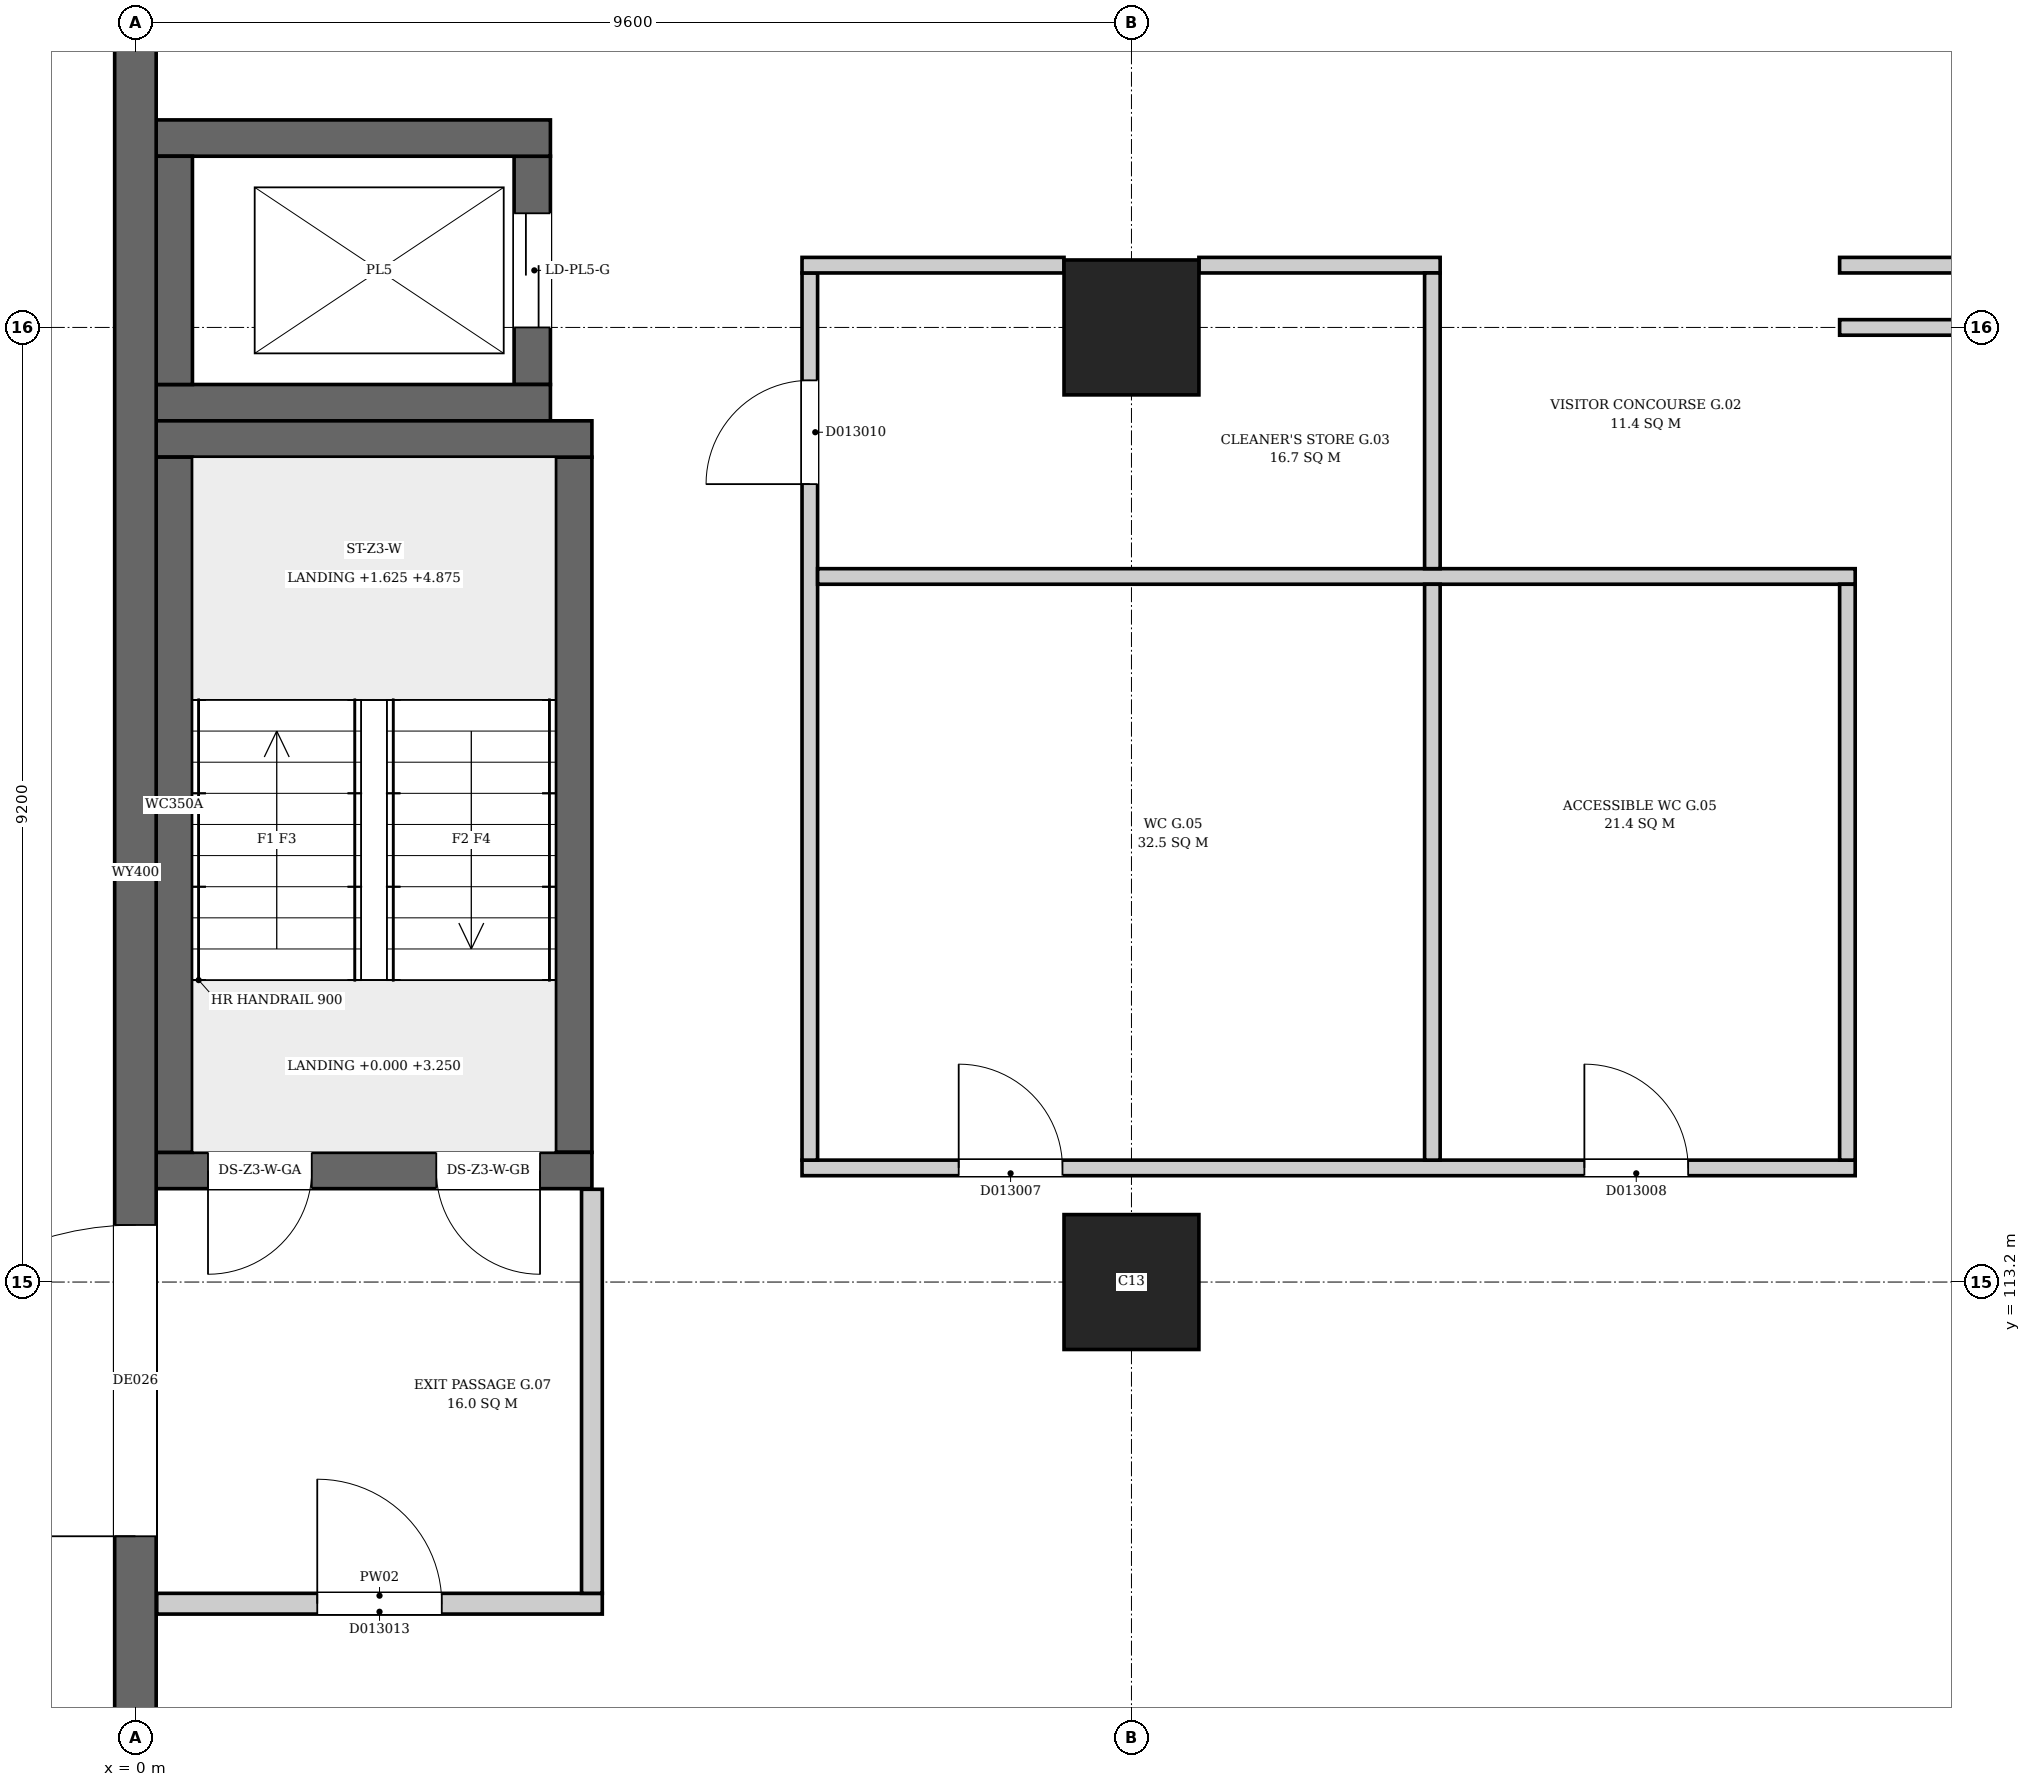
"""IFC4 building model, lengths in metres.
Left out: names, types, materials, properties, quantities, classifications, styles, units other than length and angle.
Written with IfcOpenShell. Run it as: python <this file> out.ifc"""

import sys

from ifc_helpers import new_model, si_unit, direction, frame, frame_2d, origin, origin_2d, place, context, subcontext, project, spatial, rectangle, extrude, element, fill, save


model = new_model("IFC4")
c1 = context("Model", 3, precision=1e-05, world=origin(), true_north=direction((0.0, 1.0)))
c2 = subcontext(c1, "Body", "Model", "MODEL_VIEW")
j1 = project(units=[si_unit("LENGTHUNIT", "METRE"), si_unit("PLANEANGLEUNIT", "RADIAN")], contexts=[c1])
p1 = place(None, origin())
s1 = spatial("IfcSite", under=j1, at=p1, CompositionType="ELEMENT")
p2 = place(p1, origin())
s2 = spatial("IfcBuilding", under=s1, at=p2, CompositionType="ELEMENT")
p3 = place(p2, origin())
s3 = spatial("IfcBuildingStorey", under=s2, at=p3, CompositionType="ELEMENT", Elevation=0.0)
p4 = place(p3, frame((0.0, 94.12, 0.0), z_axis=(0.0, 0.0, 1.0), x_axis=(0.0, 1.0, 0.0)))
e1 = element("IfcWall", 1, at=p4, inside=s3, PredefinedType="SHEAR", context=c2, shape_type="SweptSolid", body=[
    extrude(rectangle(XDim=46.88, YDim=0.4, at=frame_2d((23.44, 0.0))), origin(), (0.0, 0.0, 1.0), 6.5),
])
p5 = place(p4, frame((16.63, 0.0, 0.0)))
e2 = element("IfcOpeningElement", 2, at=p5, cuts=e1, PredefinedType="OPENING", context=c2, shape_type="SweptSolid", body=[
    extrude(rectangle(XDim=3.0, YDim=2.4, at=frame_2d((1.5, 1.2))), frame((0.0, 0.21, 0.0), z_axis=(0.0, -1.0, 0.0), x_axis=(1.0, 0.0, 0.0)), (0.0, 0.0, 1.0), 0.42),
])
p6 = place(p3, frame((0.2, 114.275, 0.0), z_axis=(0.0, 0.0, 1.0), x_axis=(1.0, 0.0, 0.0)))
e3 = element("IfcWall", 3, at=p6, inside=s3, PredefinedType="SHEAR", context=c2, shape_type="SweptSolid", body=[
    extrude(rectangle(XDim=4.2, YDim=0.35, at=frame_2d((2.1, 0.0))), origin(), (0.0, 0.0, 1.0), 6.5),
])
p7 = place(p6, frame((0.5, 0.0, 0.0)))
e4 = element("IfcOpeningElement", 4, at=p7, cuts=e3, PredefinedType="OPENING", context=c2, shape_type="SweptSolid", body=[
    extrude(rectangle(XDim=1.0, YDim=2.1, at=frame_2d((0.5, 1.05))), frame((0.0, 0.185, 0.0), z_axis=(0.0, -1.0, 0.0), x_axis=(1.0, 0.0, 0.0)), (0.0, 0.0, 1.0), 0.37),
])
p8 = place(p6, frame((2.7, 0.0, 0.0)))
e5 = element("IfcOpeningElement", 5, at=p8, cuts=e3, PredefinedType="OPENING", context=c2, shape_type="SweptSolid", body=[
    extrude(rectangle(XDim=1.0, YDim=2.1, at=frame_2d((0.5, 1.05))), frame((0.0, 0.185, 0.0), z_axis=(0.0, -1.0, 0.0), x_axis=(1.0, 0.0, 0.0)), (0.0, 0.0, 1.0), 0.37),
])
p9 = place(p3, frame((0.2, 121.325, 0.0), z_axis=(0.0, 0.0, 1.0), x_axis=(1.0, 0.0, 0.0)))
e6 = element("IfcWall", 6, at=p9, inside=s3, PredefinedType="SHEAR", context=c2, shape_type="SweptSolid", body=[
    extrude(rectangle(XDim=4.2, YDim=0.35, at=frame_2d((2.1, 0.0))), origin(), (0.0, 0.0, 1.0), 6.5),
])
for number, where, z_axis, x_axis in (
    (7, (0.375, 114.45, 0.0), (0.0, 0.0, 1.0), (0.0, 1.0, 0.0)),
    (8, (4.225, 114.45, 0.0), (0.0, 0.0, 1.0), (0.0, 1.0, 0.0)),
):
    element("IfcWall", number, at=place(p3, frame(where, z_axis=z_axis, x_axis=x_axis)), inside=s3, PredefinedType="SHEAR", context=c2, shape_type="SweptSolid", body=[
        extrude(rectangle(XDim=6.7, YDim=0.35, at=frame_2d((3.35, 0.0))), origin(), (0.0, 0.0, 1.0), 6.5),
    ])
for number, where, z_axis, x_axis in (
    (9, (0.2, 121.675, 0.0), (0.0, 0.0, 1.0), (1.0, 0.0, 0.0)),
    (10, (0.2, 124.225, 0.0), (0.0, 0.0, 1.0), (1.0, 0.0, 0.0)),
):
    element("IfcWall", number, at=place(p3, frame(where, z_axis=z_axis, x_axis=x_axis)), inside=s3, PredefinedType="SHEAR", context=c2, shape_type="SweptSolid", body=[
        extrude(rectangle(XDim=3.8, YDim=0.35, at=frame_2d((1.9, 0.0))), origin(), (0.0, 0.0, 1.0), 6.5),
    ])
p10 = place(p3, frame((0.375, 121.85, 0.0), z_axis=(0.0, 0.0, 1.0), x_axis=(0.0, 1.0, 0.0)))
e11 = element("IfcWall", 11, at=p10, inside=s3, PredefinedType="SHEAR", context=c2, shape_type="SweptSolid", body=[
    extrude(rectangle(XDim=2.2, YDim=0.35, at=frame_2d((1.1, 0.0))), origin(), (0.0, 0.0, 1.0), 6.5),
])
p11 = place(p3, frame((3.825, 121.85, 0.0), z_axis=(0.0, 0.0, 1.0), x_axis=(0.0, 1.0, 0.0)))
e12 = element("IfcWall", 12, at=p11, inside=s3, PredefinedType="SHEAR", context=c2, shape_type="SweptSolid", body=[
    extrude(rectangle(XDim=2.2, YDim=0.35, at=frame_2d((1.1, 0.0))), origin(), (0.0, 0.0, 1.0), 6.5),
])
p12 = place(p11, frame((0.55, 0.0, 0.0)))
e13 = element("IfcOpeningElement", 13, at=p12, cuts=e12, PredefinedType="OPENING", context=c2, shape_type="SweptSolid", body=[
    extrude(rectangle(XDim=1.1, YDim=2.1, at=frame_2d((0.55, 1.05))), frame((0.0, 0.185, 0.0), z_axis=(0.0, -1.0, 0.0), x_axis=(1.0, 0.0, 0.0)), (0.0, 0.0, 1.0), 0.37),
])
for number, where, z_axis, x_axis in (
    (14, (9.6, 113.2, 0.0), (0.0, 0.0, 1.0), (1.0, 0.0, 0.0)),
    (15, (9.6, 122.4, 0.0), (0.0, 0.0, 1.0), (1.0, 0.0, 0.0)),
):
    element("IfcColumn", number, at=place(p3, frame(where, z_axis=z_axis, x_axis=x_axis)), inside=s3, PredefinedType="COLUMN", context=c2, shape_type="SweptSolid", body=[
        extrude(rectangle(XDim=1.3, YDim=1.3, at=origin_2d()), origin(), (0.0, 0.0, 1.0), 6.5),
    ])
p13 = place(p3, frame((0.206, 110.1, 0.0), z_axis=(0.0, 0.0, 1.0), x_axis=(1.0, 0.0, 0.0)))
e16 = element("IfcWall", 16, at=p13, inside=s3, PredefinedType="PARTITIONING", context=c2, shape_type="SweptSolid", body=[
    extrude(rectangle(XDim=4.294, YDim=0.2, at=frame_2d((2.147, 0.0))), origin(), (0.0, 0.0, 1.0), 6.15),
])
p14 = place(p13, frame((1.547, 0.0, 0.0)))
e17 = element("IfcOpeningElement", 17, at=p14, cuts=e16, PredefinedType="OPENING", context=c2, shape_type="SweptSolid", body=[
    extrude(rectangle(XDim=1.2, YDim=2.1, at=frame_2d((0.6, 1.05))), frame((0.0, 0.11, 0.0), z_axis=(0.0, -1.0, 0.0), x_axis=(1.0, 0.0, 0.0)), (0.0, 0.0, 1.0), 0.22),
])
p15 = place(p3, frame((4.4, 110.2, 0.0), z_axis=(0.0, 0.0, 1.0), x_axis=(0.0, 1.0, 0.0)))
e18 = element("IfcWall", 18, at=p15, inside=s3, PredefinedType="PARTITIONING", context=c2, shape_type="SweptSolid", body=[
    extrude(rectangle(XDim=3.894, YDim=0.2, at=frame_2d((1.947, 0.0))), origin(), (0.0, 0.0, 1.0), 6.15),
])
p16 = place(p3, frame((6.425, 114.3, 0.0), z_axis=(0.0, 0.0, 1.0), x_axis=(1.0, 0.0, 0.0)))
e19 = element("IfcWall", 19, at=p16, inside=s3, PredefinedType="PARTITIONING", context=c2, shape_type="SweptSolid", body=[
    extrude(rectangle(XDim=10.15, YDim=0.15, at=frame_2d((5.075, 0.0))), origin(), (0.0, 0.0, 1.0), 6.15),
])
p17 = place(p16, frame((1.51, 0.0, 0.0)))
e20 = element("IfcOpeningElement", 20, at=p17, cuts=e19, PredefinedType="OPENING", context=c2, shape_type="SweptSolid", body=[
    extrude(rectangle(XDim=1.0, YDim=2.1, at=frame_2d((0.5, 1.05))), frame((0.0, 0.085, 0.0), z_axis=(0.0, -1.0, 0.0), x_axis=(1.0, 0.0, 0.0)), (0.0, 0.0, 1.0), 0.17),
])
p18 = place(p16, frame((7.54, 0.0, 0.0)))
e21 = element("IfcOpeningElement", 21, at=p18, cuts=e19, PredefinedType="OPENING", context=c2, shape_type="SweptSolid", body=[
    extrude(rectangle(XDim=1.0, YDim=2.1, at=frame_2d((0.5, 1.05))), frame((0.0, 0.085, 0.0), z_axis=(0.0, -1.0, 0.0), x_axis=(1.0, 0.0, 0.0)), (0.0, 0.0, 1.0), 0.17),
])
p19 = place(p3, frame((6.5, 114.375, 0.0), z_axis=(0.0, 0.0, 1.0), x_axis=(0.0, 1.0, 0.0)))
e22 = element("IfcWall", 22, at=p19, inside=s3, PredefinedType="PARTITIONING", context=c2, shape_type="SweptSolid", body=[
    extrude(rectangle(XDim=8.55, YDim=0.15, at=frame_2d((4.275, 0.0))), origin(), (0.0, 0.0, 1.0), 6.15),
])
p20 = place(p19, frame((6.515, 0.0, 0.0)))
e23 = element("IfcOpeningElement", 23, at=p20, cuts=e22, PredefinedType="OPENING", context=c2, shape_type="SweptSolid", body=[
    extrude(rectangle(XDim=1.0, YDim=2.1, at=frame_2d((0.5, 1.05))), frame((0.0, 0.085, 0.0), z_axis=(0.0, -1.0, 0.0), x_axis=(1.0, 0.0, 0.0)), (0.0, 0.0, 1.0), 0.17),
])
p21 = place(p3, frame((6.425, 123.0, 0.0), z_axis=(0.0, 0.0, 1.0), x_axis=(1.0, 0.0, 0.0)))
e24 = element("IfcWall", 24, at=p21, inside=s3, PredefinedType="PARTITIONING", context=c2, shape_type="SweptSolid", body=[
    extrude(rectangle(XDim=2.525, YDim=0.15, at=frame_2d((1.262, 0.0))), origin(), (0.0, 0.0, 1.0), 6.15),
])
p22 = place(p3, frame((6.575, 120.0, 0.0), z_axis=(0.0, 0.0, 1.0), x_axis=(1.0, 0.0, 0.0)))
e25 = element("IfcWall", 25, at=p22, inside=s3, PredefinedType="PARTITIONING", context=c2, shape_type="SweptSolid", body=[
    extrude(rectangle(XDim=10.0, YDim=0.15, at=frame_2d((5.0, 0.0))), origin(), (0.0, 0.0, 1.0), 6.15),
])
p23 = place(p3, frame((10.25, 123.0, 0.0), z_axis=(0.0, 0.0, 1.0), x_axis=(1.0, 0.0, 0.0)))
e26 = element("IfcWall", 26, at=p23, inside=s3, PredefinedType="PARTITIONING", context=c2, shape_type="SweptSolid", body=[
    extrude(rectangle(XDim=2.325, YDim=0.15, at=frame_2d((1.163, 0.0))), origin(), (0.0, 0.0, 1.0), 5.75),
])
p24 = place(p3, frame((12.5, 114.375, 0.0), z_axis=(0.0, 0.0, 1.0), x_axis=(0.0, 1.0, 0.0)))
e27 = element("IfcWall", 27, at=p24, inside=s3, PredefinedType="PARTITIONING", context=c2, shape_type="SweptSolid", body=[
    extrude(rectangle(XDim=5.55, YDim=0.15, at=frame_2d((2.775, 0.0))), origin(), (0.0, 0.0, 1.0), 6.15),
])
p25 = place(p3, frame((12.5, 120.075, 0.0), z_axis=(0.0, 0.0, 1.0), x_axis=(0.0, 1.0, 0.0)))
e28 = element("IfcWall", 28, at=p25, inside=s3, PredefinedType="PARTITIONING", context=c2, shape_type="SweptSolid", body=[
    extrude(rectangle(XDim=2.85, YDim=0.15, at=frame_2d((1.425, 0.0))), origin(), (0.0, 0.0, 1.0), 6.15),
])
p26 = place(p3, frame((16.5, 114.375, 0.0), z_axis=(0.0, 0.0, 1.0), x_axis=(0.0, 1.0, 0.0)))
e29 = element("IfcWall", 29, at=p26, inside=s3, PredefinedType="PARTITIONING", context=c2, shape_type="SweptSolid", body=[
    extrude(rectangle(XDim=5.55, YDim=0.15, at=frame_2d((2.775, 0.0))), origin(), (0.0, 0.0, 1.0), 6.15),
])
for number, where, z_axis, x_axis in (
    (30, (16.425, 122.4, 0.0), (0.0, 0.0, 1.0), (1.0, 0.0, 0.0)),
    (31, (16.425, 123.0, 0.0), (0.0, 0.0, 1.0), (1.0, 0.0, 0.0)),
):
    element("IfcWall", number, at=place(p3, frame(where, z_axis=z_axis, x_axis=x_axis)), inside=s3, PredefinedType="PARTITIONING", context=c2, shape_type="SweptSolid", body=[
        extrude(rectangle(XDim=2.125, YDim=0.15, at=frame_2d((1.062, 0.0))), origin(), (0.0, 0.0, 1.0), 5.75),
    ])
p27 = place(p5, origin())
e32 = element("IfcDoor", 32, at=p27, inside=s3, OperationType="DOUBLE_DOOR_SINGLE_SWING", PredefinedType="DOOR", context=c2, shape_type="SweptSolid", body=[
    extrude(rectangle(XDim=3.0, YDim=2.4, at=frame_2d((1.5, 1.2))), frame((0.0, 0.025, 0.0), z_axis=(0.0, -1.0, 0.0), x_axis=(1.0, 0.0, 0.0)), (0.0, 0.0, 1.0), 0.05),
])
fill(e2, e32)
p28 = place(p7, origin())
e33 = element("IfcDoor", 33, at=p28, inside=s3, OperationType="SINGLE_SWING_LEFT", PredefinedType="DOOR", context=c2, shape_type="SweptSolid", body=[
    extrude(rectangle(XDim=1.0, YDim=2.1, at=frame_2d((0.5, 1.05))), frame((0.0, 0.025, 0.0), z_axis=(0.0, -1.0, 0.0), x_axis=(1.0, 0.0, 0.0)), (0.0, 0.0, 1.0), 0.05),
])
fill(e4, e33)
p29 = place(p8, origin())
e34 = element("IfcDoor", 34, at=p29, inside=s3, OperationType="SINGLE_SWING_RIGHT", PredefinedType="DOOR", context=c2, shape_type="SweptSolid", body=[
    extrude(rectangle(XDim=1.0, YDim=2.1, at=frame_2d((0.5, 1.05))), frame((0.0, 0.025, 0.0), z_axis=(0.0, -1.0, 0.0), x_axis=(1.0, 0.0, 0.0)), (0.0, 0.0, 1.0), 0.05),
])
fill(e5, e34)
p30 = place(p12, origin())
e35 = element("IfcDoor", 35, at=p30, inside=s3, OperationType="DOUBLE_DOOR_SLIDING", PredefinedType="DOOR", context=c2, shape_type="SweptSolid", body=[
    extrude(rectangle(XDim=1.1, YDim=2.1, at=frame_2d((0.55, 1.05))), frame((0.0, 0.025, 0.0), z_axis=(0.0, -1.0, 0.0), x_axis=(1.0, 0.0, 0.0)), (0.0, 0.0, 1.0), 0.05),
])
fill(e13, e35)
p31 = place(p17, origin())
e36 = element("IfcDoor", 36, at=p31, inside=s3, OperationType="SINGLE_SWING_LEFT", PredefinedType="DOOR", context=c2, shape_type="SweptSolid", body=[
    extrude(rectangle(XDim=1.0, YDim=2.1, at=frame_2d((0.5, 1.05))), frame((0.0, 0.025, 0.0), z_axis=(0.0, -1.0, 0.0), x_axis=(1.0, 0.0, 0.0)), (0.0, 0.0, 1.0), 0.05),
])
fill(e20, e36)
p32 = place(p18, origin())
e37 = element("IfcDoor", 37, at=p32, inside=s3, OperationType="SINGLE_SWING_RIGHT", PredefinedType="DOOR", context=c2, shape_type="SweptSolid", body=[
    extrude(rectangle(XDim=1.0, YDim=2.1, at=frame_2d((0.5, 1.05))), frame((0.0, 0.025, 0.0), z_axis=(0.0, -1.0, 0.0), x_axis=(1.0, 0.0, 0.0)), (0.0, 0.0, 1.0), 0.05),
])
fill(e21, e37)
p33 = place(p20, origin())
e38 = element("IfcDoor", 38, at=p33, inside=s3, OperationType="SINGLE_SWING_LEFT", PredefinedType="DOOR", context=c2, shape_type="SweptSolid", body=[
    extrude(rectangle(XDim=1.0, YDim=2.1, at=frame_2d((0.5, 1.05))), frame((0.0, 0.025, 0.0), z_axis=(0.0, -1.0, 0.0), x_axis=(1.0, 0.0, 0.0)), (0.0, 0.0, 1.0), 0.05),
])
fill(e23, e38)
p34 = place(p14, origin())
e39 = element("IfcDoor", 39, at=p34, inside=s3, OperationType="SINGLE_SWING_RIGHT", PredefinedType="DOOR", context=c2, shape_type="SweptSolid", body=[
    extrude(rectangle(XDim=1.2, YDim=2.1, at=frame_2d((0.6, 1.05))), frame((0.0, 0.025, 0.0), z_axis=(0.0, -1.0, 0.0), x_axis=(1.0, 0.0, 0.0)), (0.0, 0.0, 1.0), 0.05),
])
fill(e17, e39)
save(model, sys.argv[1])
